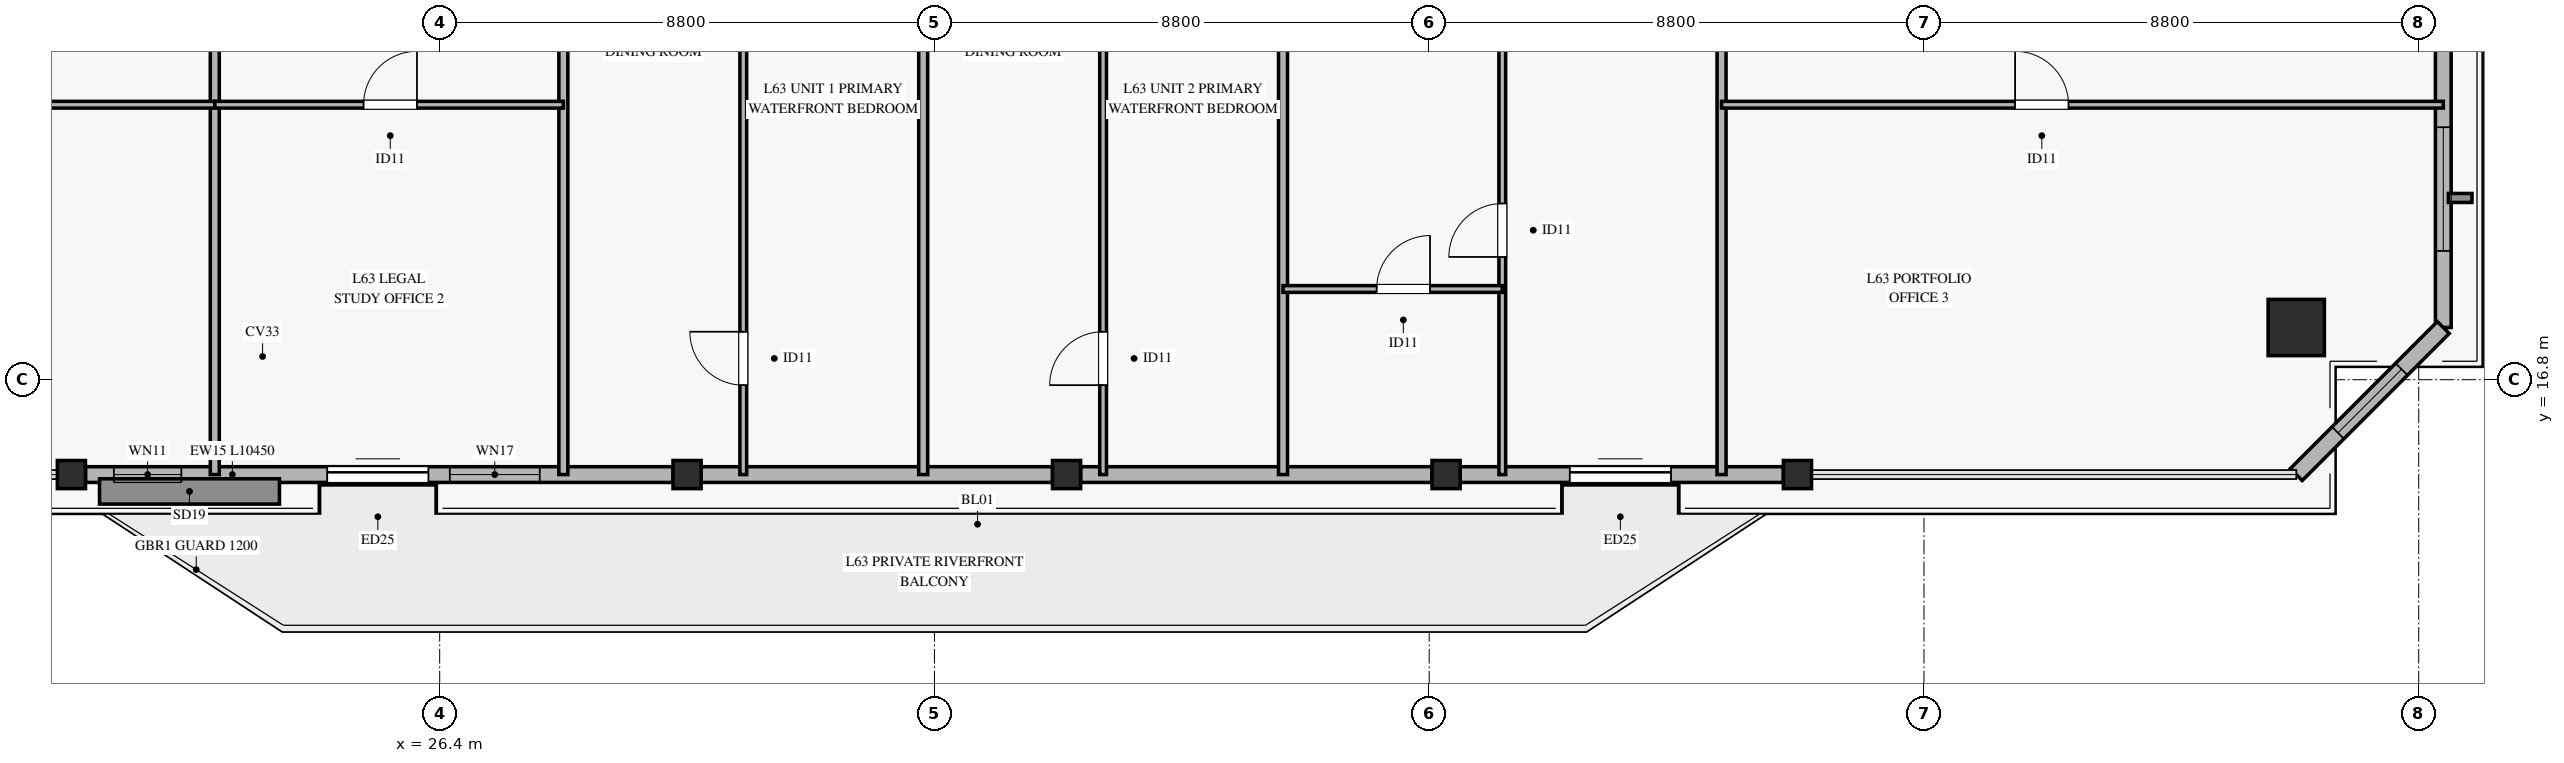
"""IFC4 building model, lengths in metres.
Left out: names, types, materials, properties, quantities, classifications, styles, units other than length and angle.
Written with IfcOpenShell. Run it as: python <this file> out.ifc"""

import sys

from ifc_helpers import new_model, si_unit, direction, frame, frame_2d, origin, origin_2d, place, context, subcontext, project, spatial, rectangle, hollow_rectangle, extrude, source, transform, mapped, element, fill, save


model = new_model("IFC4")
c1 = context("Model", 3, precision=1e-05, world=origin(), true_north=direction((0.0, 1.0)))
c2 = subcontext(c1, "Body", "Model", "MODEL_VIEW")
j1 = project(units=[si_unit("LENGTHUNIT", "METRE"), si_unit("PLANEANGLEUNIT", "RADIAN")], contexts=[c1])
p1 = place(None, origin())
s1 = spatial("IfcSite", under=j1, at=p1, CompositionType="ELEMENT")
p2 = place(p1, origin())
s2 = spatial("IfcBuilding", under=s1, at=p2, CompositionType="ELEMENT")
p3 = place(p2, frame((0.0, 0.0, 248.5)))
s3 = spatial("IfcBuildingStorey", under=s2, at=p3, CompositionType="ELEMENT", Elevation=248.5)
m1 = source(origin(), c2, "Body", "SweptSolid", [
    extrude(hollow_rectangle(XDim=1.0, YDim=1.0, WallThickness=0.045, at=origin_2d()), origin(), (0.0, 0.0, 1.0), 3.185),
])
p4 = place(p3, frame((59.422, 17.728, 0.0), z_axis=(0.0, 0.0, 1.0), x_axis=(1.0, 0.0, 0.0)))
e1 = element("IfcColumn", 1, at=p4, inside=s3, PredefinedType="COLUMN", context=c2, shape_type="MappedRepresentation", body=[
    mapped(m1, transform((0.0, 0.0, 0.0), x_axis=(1.0, 0.0, 0.0), y_axis=(0.0, 1.0, 0.0), z_axis=(0.0, 0.0, 1.0), scale=1.0)),
])
m2 = source(origin(), c2, "Body", "SweptSolid", [
    extrude(hollow_rectangle(XDim=0.5, YDim=0.5, WallThickness=0.024, at=origin_2d()), origin(), (0.0, 0.0, 1.0), 3.185),
])
for number, where, z_axis, x_axis in (
    (2, (19.85, 15.113, 0.0), (0.0, 0.0, 1.0), (1.0, 0.0, 0.0)),
    (3, (30.8, 15.113, 0.0), (0.0, 0.0, 1.0), (1.0, 0.0, 0.0)),
    (4, (37.55, 15.113, 0.0), (0.0, 0.0, 1.0), (1.0, 0.0, 0.0)),
    (5, (44.3, 15.113, 0.0), (0.0, 0.0, 1.0), (1.0, 0.0, 0.0)),
    (6, (50.55, 15.113, 0.0), (0.0, 0.0, 1.0), (1.0, 0.0, 0.0)),
):
    element("IfcColumn", number, at=place(p3, frame(where, z_axis=z_axis, x_axis=x_axis)), inside=s3, PredefinedType="COLUMN", context=c2, shape_type="MappedRepresentation", body=[
        mapped(m2, transform((0.0, 0.0, 0.0), x_axis=(1.0, 0.0, 0.0), y_axis=(0.0, 1.0, 0.0), z_axis=(0.0, 0.0, 1.0), scale=1.0)),
    ])
p5 = place(p3, frame((20.1, 15.113, 0.0), z_axis=(0.0, 0.0, 1.0), x_axis=(1.0, 0.0, 0.0)))
e7 = element("IfcWall", 7, at=p5, inside=s3, PredefinedType="SOLIDWALL", context=c2, shape_type="SweptSolid", body=[
    extrude(rectangle(XDim=10.45, YDim=0.28, at=frame_2d((5.225, 0.0))), origin(), (0.0, 0.0, 1.0), 2.815),
])
p6 = place(p5, frame((4.3, 0.0, 0.0)))
e8 = element("IfcOpeningElement", 8, at=p6, cuts=e7, PredefinedType="OPENING", context=c2, shape_type="SweptSolid", body=[
    extrude(rectangle(XDim=1.8, YDim=2.25, at=frame_2d((0.9, 1.125))), frame((0.0, 0.15, 0.0), z_axis=(0.0, -1.0, 0.0), x_axis=(1.0, 0.0, 0.0)), (0.0, 0.0, 1.0), 0.3),
])
p7 = place(p5, frame((0.505, 0.0, 0.45)))
e9 = element("IfcOpeningElement", 9, at=p7, cuts=e7, PredefinedType="OPENING", context=c2, shape_type="SweptSolid", body=[
    extrude(rectangle(XDim=1.2, YDim=2.0, at=frame_2d((0.6, 1.0))), frame((0.0, 0.15, 0.0), z_axis=(0.0, -1.0, 0.0), x_axis=(1.0, 0.0, 0.0)), (0.0, 0.0, 1.0), 0.3),
])
p8 = place(p5, frame((6.48, 0.0, 0.45)))
e10 = element("IfcOpeningElement", 10, at=p8, cuts=e7, PredefinedType="OPENING", context=c2, shape_type="SweptSolid", body=[
    extrude(rectangle(XDim=1.6, YDim=2.0, at=frame_2d((0.8, 1.0))), frame((0.0, 0.15, 0.0), z_axis=(0.0, -1.0, 0.0), x_axis=(1.0, 0.0, 0.0)), (0.0, 0.0, 1.0), 0.3),
])
for number, where, z_axis, x_axis in (
    (11, (31.05, 15.113, 0.0), (0.0, 0.0, 1.0), (1.0, 0.0, 0.0)),
    (12, (37.8, 15.113, 0.0), (0.0, 0.0, 1.0), (1.0, 0.0, 0.0)),
):
    element("IfcWall", number, at=place(p3, frame(where, z_axis=z_axis, x_axis=x_axis)), inside=s3, PredefinedType="SOLIDWALL", context=c2, shape_type="SweptSolid", body=[
        extrude(rectangle(XDim=6.25, YDim=0.28, at=frame_2d((3.125, 0.0))), origin(), (0.0, 0.0, 1.0), 2.815),
    ])
p9 = place(p3, frame((44.55, 15.113, 0.0), z_axis=(0.0, 0.0, 1.0), x_axis=(1.0, 0.0, 0.0)))
e13 = element("IfcWall", 13, at=p9, inside=s3, PredefinedType="SOLIDWALL", context=c2, shape_type="SweptSolid", body=[
    extrude(rectangle(XDim=5.75, YDim=0.28, at=frame_2d((2.875, 0.0))), origin(), (0.0, 0.0, 1.0), 2.815),
])
p10 = place(p9, frame((1.95, 0.0, 0.0)))
e14 = element("IfcOpeningElement", 14, at=p10, cuts=e13, PredefinedType="OPENING", context=c2, shape_type="SweptSolid", body=[
    extrude(rectangle(XDim=1.8, YDim=2.25, at=frame_2d((0.9, 1.125))), frame((0.0, 0.15, 0.0), z_axis=(0.0, -1.0, 0.0), x_axis=(1.0, 0.0, 0.0)), (0.0, 0.0, 1.0), 0.3),
])
p11 = place(p3, frame((62.037, 17.728, 0.0), z_axis=(0.0, 0.0, 1.0), x_axis=(0.0, 1.0, 0.0)))
e15 = element("IfcWall", 15, at=p11, inside=s3, PredefinedType="SOLIDWALL", context=c2, shape_type="SweptSolid", body=[
    extrude(rectangle(XDim=12.629, YDim=0.28, at=frame_2d((6.314, 0.0))), origin(), (0.0, 0.0, 1.0), 2.815),
])
p12 = place(p11, frame((1.362, 0.0, 0.45)))
e16 = element("IfcOpeningElement", 16, at=p12, cuts=e15, PredefinedType="OPENING", context=c2, shape_type="SweptSolid", body=[
    extrude(rectangle(XDim=2.2, YDim=2.1, at=frame_2d((1.1, 1.05))), frame((0.0, 0.15, 0.0), z_axis=(0.0, -1.0, 0.0), x_axis=(1.0, 0.0, 0.0)), (0.0, 0.0, 1.0), 0.3),
])
p13 = place(p11, frame((7.74, 0.0, 0.45)))
e17 = element("IfcOpeningElement", 17, at=p13, cuts=e15, PredefinedType="OPENING", context=c2, shape_type="SweptSolid", body=[
    extrude(rectangle(XDim=2.2, YDim=2.1, at=frame_2d((1.1, 1.05))), frame((0.0, 0.15, 0.0), z_axis=(0.0, -1.0, 0.0), x_axis=(1.0, 0.0, 0.0)), (0.0, 0.0, 1.0), 0.3),
])
p14 = place(p3, frame((59.422, 15.113, 0.0), z_axis=(0.0, 0.0, 1.0), x_axis=(0.707106781187, 0.707106781187, 0.0)))
e18 = element("IfcWall", 18, at=p14, inside=s3, PredefinedType="SOLIDWALL", context=c2, shape_type="SweptSolid", body=[
    extrude(rectangle(XDim=3.698, YDim=0.3, at=frame_2d((1.849, 0.0))), origin(), (0.0, 0.0, 1.0), 2.815),
])
p15 = place(p14, frame((1.049, 0.0, 0.45)))
e19 = element("IfcOpeningElement", 19, at=p15, cuts=e18, PredefinedType="OPENING", context=c2, shape_type="SweptSolid", body=[
    extrude(rectangle(XDim=1.6, YDim=2.0, at=frame_2d((0.8, 1.0))), frame((0.0, 0.16, 0.0), z_axis=(0.0, -1.0, 0.0), x_axis=(1.0, 0.0, 0.0)), (0.0, 0.0, 1.0), 0.32),
])
for number, where, z_axis, x_axis in (
    (20, (22.4, 15.113, 0.0), (0.0, 0.0, 1.0), (0.0, 1.0, 0.0)),
    (21, (28.6, 15.113, 0.0), (0.0, 0.0, 1.0), (0.0, 1.0, 0.0)),
    (22, (35.0, 15.113, 0.0), (0.0, 0.0, 1.0), (0.0, 1.0, 0.0)),
    (23, (41.4, 15.113, 0.0), (0.0, 0.0, 1.0), (0.0, 1.0, 0.0)),
    (24, (49.2, 15.113, 0.0), (0.0, 0.0, 1.0), (0.0, 1.0, 0.0)),
):
    element("IfcWall", number, at=place(p3, frame(where, z_axis=z_axis, x_axis=x_axis)), inside=s3, PredefinedType="PARTITIONING", context=c2, shape_type="SweptSolid", body=[
        extrude(rectangle(XDim=19.037, YDim=0.16, at=frame_2d((9.519, 0.0))), origin(), (0.0, 0.0, 1.0), 2.77),
    ])
p16 = place(p3, frame((8.364, 21.69, 0.0), z_axis=(0.0, 0.0, 1.0), x_axis=(1.0, 0.0, 0.0)))
e25 = element("IfcWall", 25, at=p16, inside=s3, PredefinedType="PARTITIONING", context=c2, shape_type="SweptSolid", body=[
    extrude(rectangle(XDim=14.036, YDim=0.12, at=frame_2d((7.018, 0.0))), origin(), (0.0, 0.0, 1.0), 2.47),
])
p17 = place(p16, frame((5.9, 0.0, 0.0)))
e26 = element("IfcOpeningElement", 26, at=p17, cuts=e25, PredefinedType="OPENING", context=c2, shape_type="SweptSolid", body=[
    extrude(rectangle(XDim=0.95, YDim=2.1, at=frame_2d((0.475, 1.05))), frame((0.0, 0.07, 0.0), z_axis=(0.0, -1.0, 0.0), x_axis=(1.0, 0.0, 0.0)), (0.0, 0.0, 1.0), 0.14),
])
p18 = place(p3, frame((22.4, 21.69, 0.0), z_axis=(0.0, 0.0, 1.0), x_axis=(1.0, 0.0, 0.0)))
e27 = element("IfcWall", 27, at=p18, inside=s3, PredefinedType="PARTITIONING", context=c2, shape_type="SweptSolid", body=[
    extrude(rectangle(XDim=6.2, YDim=0.12, at=frame_2d((3.1, 0.0))), origin(), (0.0, 0.0, 1.0), 3.185),
])
p19 = place(p18, frame((2.646, 0.0, 0.0)))
e28 = element("IfcOpeningElement", 28, at=p19, cuts=e27, PredefinedType="OPENING", context=c2, shape_type="SweptSolid", body=[
    extrude(rectangle(XDim=0.95, YDim=2.1, at=frame_2d((0.475, 1.05))), frame((0.0, 0.07, 0.0), z_axis=(0.0, -1.0, 0.0), x_axis=(1.0, 0.0, 0.0)), (0.0, 0.0, 1.0), 0.14),
])
p20 = place(p3, frame((31.8, 15.113, 0.0), z_axis=(0.0, 0.0, 1.0), x_axis=(0.0, 1.0, 0.0)))
e29 = element("IfcWall", 29, at=p20, inside=s3, PredefinedType="PARTITIONING", context=c2, shape_type="SweptSolid", body=[
    extrude(rectangle(XDim=16.387, YDim=0.12, at=frame_2d((8.193, 0.0))), origin(), (0.0, 0.0, 1.0), 2.77),
])
p21 = place(p20, frame((1.59, 0.0, 0.0)))
e30 = element("IfcOpeningElement", 30, at=p21, cuts=e29, PredefinedType="OPENING", context=c2, shape_type="SweptSolid", body=[
    extrude(rectangle(XDim=0.95, YDim=2.1, at=frame_2d((0.475, 1.05))), frame((0.0, 0.07, 0.0), z_axis=(0.0, -1.0, 0.0), x_axis=(1.0, 0.0, 0.0)), (0.0, 0.0, 1.0), 0.14),
])
p22 = place(p20, frame((12.827, 0.0, 0.0)))
e31 = element("IfcOpeningElement", 31, at=p22, cuts=e29, PredefinedType="OPENING", context=c2, shape_type="SweptSolid", body=[
    extrude(rectangle(XDim=0.95, YDim=2.1, at=frame_2d((0.475, 1.05))), frame((0.0, 0.07, 0.0), z_axis=(0.0, -1.0, 0.0), x_axis=(1.0, 0.0, 0.0)), (0.0, 0.0, 1.0), 0.14),
])
p23 = place(p3, frame((38.2, 15.113, 0.0), z_axis=(0.0, 0.0, 1.0), x_axis=(0.0, 1.0, 0.0)))
e32 = element("IfcWall", 32, at=p23, inside=s3, PredefinedType="PARTITIONING", context=c2, shape_type="SweptSolid", body=[
    extrude(rectangle(XDim=16.387, YDim=0.12, at=frame_2d((8.193, 0.0))), origin(), (0.0, 0.0, 1.0), 2.77),
])
p24 = place(p23, frame((1.59, 0.0, 0.0)))
e33 = element("IfcOpeningElement", 33, at=p24, cuts=e32, PredefinedType="OPENING", context=c2, shape_type="SweptSolid", body=[
    extrude(rectangle(XDim=0.95, YDim=2.1, at=frame_2d((0.475, 1.05))), frame((0.0, 0.07, 0.0), z_axis=(0.0, -1.0, 0.0), x_axis=(1.0, 0.0, 0.0)), (0.0, 0.0, 1.0), 0.14),
])
p25 = place(p23, frame((12.827, 0.0, 0.0)))
e34 = element("IfcOpeningElement", 34, at=p25, cuts=e32, PredefinedType="OPENING", context=c2, shape_type="SweptSolid", body=[
    extrude(rectangle(XDim=0.95, YDim=2.1, at=frame_2d((0.475, 1.05))), frame((0.0, 0.07, 0.0), z_axis=(0.0, -1.0, 0.0), x_axis=(1.0, 0.0, 0.0)), (0.0, 0.0, 1.0), 0.14),
])
p26 = place(p3, frame((45.3, 15.113, 0.0), z_axis=(0.0, 0.0, 1.0), x_axis=(0.0, 1.0, 0.0)))
e35 = element("IfcWall", 35, at=p26, inside=s3, PredefinedType="PARTITIONING", context=c2, shape_type="SweptSolid", body=[
    extrude(rectangle(XDim=16.387, YDim=0.12, at=frame_2d((8.193, 0.0))), origin(), (0.0, 0.0, 1.0), 2.77),
])
p27 = place(p26, frame((3.87, 0.0, 0.0)))
e36 = element("IfcOpeningElement", 36, at=p27, cuts=e35, PredefinedType="OPENING", context=c2, shape_type="SweptSolid", body=[
    extrude(rectangle(XDim=0.95, YDim=2.1, at=frame_2d((0.475, 1.05))), frame((0.0, 0.07, 0.0), z_axis=(0.0, -1.0, 0.0), x_axis=(1.0, 0.0, 0.0)), (0.0, 0.0, 1.0), 0.14),
])
p28 = place(p26, frame((12.827, 0.0, 0.0)))
e37 = element("IfcOpeningElement", 37, at=p28, cuts=e35, PredefinedType="OPENING", context=c2, shape_type="SweptSolid", body=[
    extrude(rectangle(XDim=0.95, YDim=2.1, at=frame_2d((0.475, 1.05))), frame((0.0, 0.07, 0.0), z_axis=(0.0, -1.0, 0.0), x_axis=(1.0, 0.0, 0.0)), (0.0, 0.0, 1.0), 0.14),
])
p29 = place(p3, frame((41.4, 18.413, 0.0), z_axis=(0.0, 0.0, 1.0), x_axis=(1.0, 0.0, 0.0)))
e38 = element("IfcWall", 38, at=p29, inside=s3, PredefinedType="PARTITIONING", context=c2, shape_type="SweptSolid", body=[
    extrude(rectangle(XDim=3.9, YDim=0.12, at=frame_2d((1.95, 0.0))), origin(), (0.0, 0.0, 1.0), 2.47),
])
p30 = place(p29, frame((1.665, 0.0, 0.0)))
e39 = element("IfcOpeningElement", 39, at=p30, cuts=e38, PredefinedType="OPENING", context=c2, shape_type="SweptSolid", body=[
    extrude(rectangle(XDim=0.95, YDim=2.1, at=frame_2d((0.475, 1.05))), frame((0.0, 0.07, 0.0), z_axis=(0.0, -1.0, 0.0), x_axis=(1.0, 0.0, 0.0)), (0.0, 0.0, 1.0), 0.14),
])
p31 = place(p3, frame((49.2, 21.69, 0.0), z_axis=(0.0, 0.0, 1.0), x_axis=(1.0, 0.0, 0.0)))
e40 = element("IfcWall", 40, at=p31, inside=s3, PredefinedType="PARTITIONING", context=c2, shape_type="SweptSolid", body=[
    extrude(rectangle(XDim=12.837, YDim=0.12, at=frame_2d((6.418, 0.0))), origin(), (0.0, 0.0, 1.0), 2.47),
])
p32 = place(p31, frame((5.221, 0.0, 0.0)))
e41 = element("IfcOpeningElement", 41, at=p32, cuts=e40, PredefinedType="OPENING", context=c2, shape_type="SweptSolid", body=[
    extrude(rectangle(XDim=0.95, YDim=2.1, at=frame_2d((0.475, 1.05))), frame((0.0, 0.07, 0.0), z_axis=(0.0, -1.0, 0.0), x_axis=(1.0, 0.0, 0.0)), (0.0, 0.0, 1.0), 0.14),
])
m3 = source(origin(), c2, "Body", "SweptSolid", [
    extrude(rectangle(XDim=1.8, YDim=2.25, at=frame_2d((0.9, 1.125))), frame((0.0, 0.025, 0.0), z_axis=(0.0, -1.0, 0.0), x_axis=(1.0, 0.0, 0.0)), (0.0, 0.0, 1.0), 0.05),
])
p33 = place(p6, origin())
e42 = element("IfcDoor", 42, at=p33, inside=s3, OperationType="SLIDING_TO_LEFT", PredefinedType="DOOR", context=c2, shape_type="MappedRepresentation", body=[
    mapped(m3, transform((0.0, 0.0, 0.0), x_axis=(1.0, 0.0, 0.0), y_axis=(0.0, 1.0, 0.0), z_axis=(0.0, 0.0, 1.0), scale=1.0)),
])
fill(e8, e42)
m4 = source(origin(), c2, "Body", "SweptSolid", [
    extrude(rectangle(XDim=1.2, YDim=2.0, at=frame_2d((0.6, 1.0))), frame((0.0, 0.03, 0.0), z_axis=(0.0, -1.0, 0.0), x_axis=(1.0, 0.0, 0.0)), (0.0, 0.0, 1.0), 0.06),
])
p34 = place(p7, origin())
e43 = element("IfcWindow", 43, at=p34, inside=s3, PartitioningType="SINGLE_PANEL", PredefinedType="WINDOW", context=c2, shape_type="MappedRepresentation", body=[
    mapped(m4, transform((0.0, 0.0, 0.0), x_axis=(1.0, 0.0, 0.0), y_axis=(0.0, 1.0, 0.0), z_axis=(0.0, 0.0, 1.0), scale=1.0)),
])
fill(e9, e43)
m5 = source(origin(), c2, "Body", "SweptSolid", [
    extrude(rectangle(XDim=1.6, YDim=2.0, at=frame_2d((0.8, 1.0))), frame((0.0, 0.03, 0.0), z_axis=(0.0, -1.0, 0.0), x_axis=(1.0, 0.0, 0.0)), (0.0, 0.0, 1.0), 0.06),
])
p35 = place(p8, origin())
e44 = element("IfcWindow", 44, at=p35, inside=s3, PartitioningType="SINGLE_PANEL", PredefinedType="WINDOW", context=c2, shape_type="MappedRepresentation", body=[
    mapped(m5, transform((0.0, 0.0, 0.0), x_axis=(1.0, 0.0, 0.0), y_axis=(0.0, 1.0, 0.0), z_axis=(0.0, 0.0, 1.0), scale=1.0)),
])
fill(e10, e44)
p36 = place(p10, origin())
e45 = element("IfcDoor", 45, at=p36, inside=s3, OperationType="SLIDING_TO_LEFT", PredefinedType="DOOR", context=c2, shape_type="MappedRepresentation", body=[
    mapped(m3, transform((0.0, 0.0, 0.0), x_axis=(1.0, 0.0, 0.0), y_axis=(0.0, 1.0, 0.0), z_axis=(0.0, 0.0, 1.0), scale=1.0)),
])
fill(e14, e45)
m6 = source(origin(), c2, "Body", "SweptSolid", [
    extrude(rectangle(XDim=2.2, YDim=2.1, at=frame_2d((1.1, 1.05))), frame((0.0, 0.03, 0.0), z_axis=(0.0, -1.0, 0.0), x_axis=(1.0, 0.0, 0.0)), (0.0, 0.0, 1.0), 0.06),
])
p37 = place(p12, origin())
e46 = element("IfcWindow", 46, at=p37, inside=s3, PartitioningType="SINGLE_PANEL", PredefinedType="WINDOW", context=c2, shape_type="MappedRepresentation", body=[
    mapped(m6, transform((0.0, 0.0, 0.0), x_axis=(1.0, 0.0, 0.0), y_axis=(0.0, 1.0, 0.0), z_axis=(0.0, 0.0, 1.0), scale=1.0)),
])
fill(e16, e46)
p38 = place(p15, origin())
e47 = element("IfcWindow", 47, at=p38, inside=s3, PartitioningType="SINGLE_PANEL", PredefinedType="WINDOW", context=c2, shape_type="MappedRepresentation", body=[
    mapped(m5, transform((0.0, 0.0, 0.0), x_axis=(1.0, 0.0, 0.0), y_axis=(0.0, 1.0, 0.0), z_axis=(0.0, 0.0, 1.0), scale=1.0)),
])
fill(e19, e47)
m7 = source(origin(), c2, "Body", "SweptSolid", [
    extrude(rectangle(XDim=0.95, YDim=2.1, at=frame_2d((0.475, 1.05))), frame((0.0, 0.025, 0.0), z_axis=(0.0, -1.0, 0.0), x_axis=(1.0, 0.0, 0.0)), (0.0, 0.0, 1.0), 0.05),
])
p39 = place(p19, origin())
e48 = element("IfcDoor", 48, at=p39, inside=s3, OperationType="SINGLE_SWING_RIGHT", PredefinedType="DOOR", context=c2, shape_type="MappedRepresentation", body=[
    mapped(m7, transform((0.0, 0.0, 0.0), x_axis=(1.0, 0.0, 0.0), y_axis=(0.0, 1.0, 0.0), z_axis=(0.0, 0.0, 1.0), scale=1.0)),
])
fill(e28, e48)
p40 = place(p21, origin())
e49 = element("IfcDoor", 49, at=p40, inside=s3, OperationType="SINGLE_SWING_RIGHT", PredefinedType="DOOR", context=c2, shape_type="MappedRepresentation", body=[
    mapped(m7, transform((0.0, 0.0, 0.0), x_axis=(1.0, 0.0, 0.0), y_axis=(0.0, 1.0, 0.0), z_axis=(0.0, 0.0, 1.0), scale=1.0)),
])
fill(e30, e49)
p41 = place(p24, origin())
e50 = element("IfcDoor", 50, at=p41, inside=s3, OperationType="SINGLE_SWING_LEFT", PredefinedType="DOOR", context=c2, shape_type="MappedRepresentation", body=[
    mapped(m7, transform((0.0, 0.0, 0.0), x_axis=(1.0, 0.0, 0.0), y_axis=(0.0, 1.0, 0.0), z_axis=(0.0, 0.0, 1.0), scale=1.0)),
])
fill(e33, e50)
p42 = place(p30, origin())
e51 = element("IfcDoor", 51, at=p42, inside=s3, OperationType="SINGLE_SWING_RIGHT", PredefinedType="DOOR", context=c2, shape_type="MappedRepresentation", body=[
    mapped(m7, transform((0.0, 0.0, 0.0), x_axis=(1.0, 0.0, 0.0), y_axis=(0.0, 1.0, 0.0), z_axis=(0.0, 0.0, 1.0), scale=1.0)),
])
fill(e39, e51)
p43 = place(p27, origin())
e52 = element("IfcDoor", 52, at=p43, inside=s3, OperationType="SINGLE_SWING_LEFT", PredefinedType="DOOR", context=c2, shape_type="MappedRepresentation", body=[
    mapped(m7, transform((0.0, 0.0, 0.0), x_axis=(1.0, 0.0, 0.0), y_axis=(0.0, 1.0, 0.0), z_axis=(0.0, 0.0, 1.0), scale=1.0)),
])
fill(e36, e52)
p44 = place(p32, origin())
e53 = element("IfcDoor", 53, at=p44, inside=s3, OperationType="SINGLE_SWING_LEFT", PredefinedType="DOOR", context=c2, shape_type="MappedRepresentation", body=[
    mapped(m7, transform((0.0, 0.0, 0.0), x_axis=(1.0, 0.0, 0.0), y_axis=(0.0, 1.0, 0.0), z_axis=(0.0, 0.0, 1.0), scale=1.0)),
])
fill(e41, e53)
save(model, sys.argv[1])
